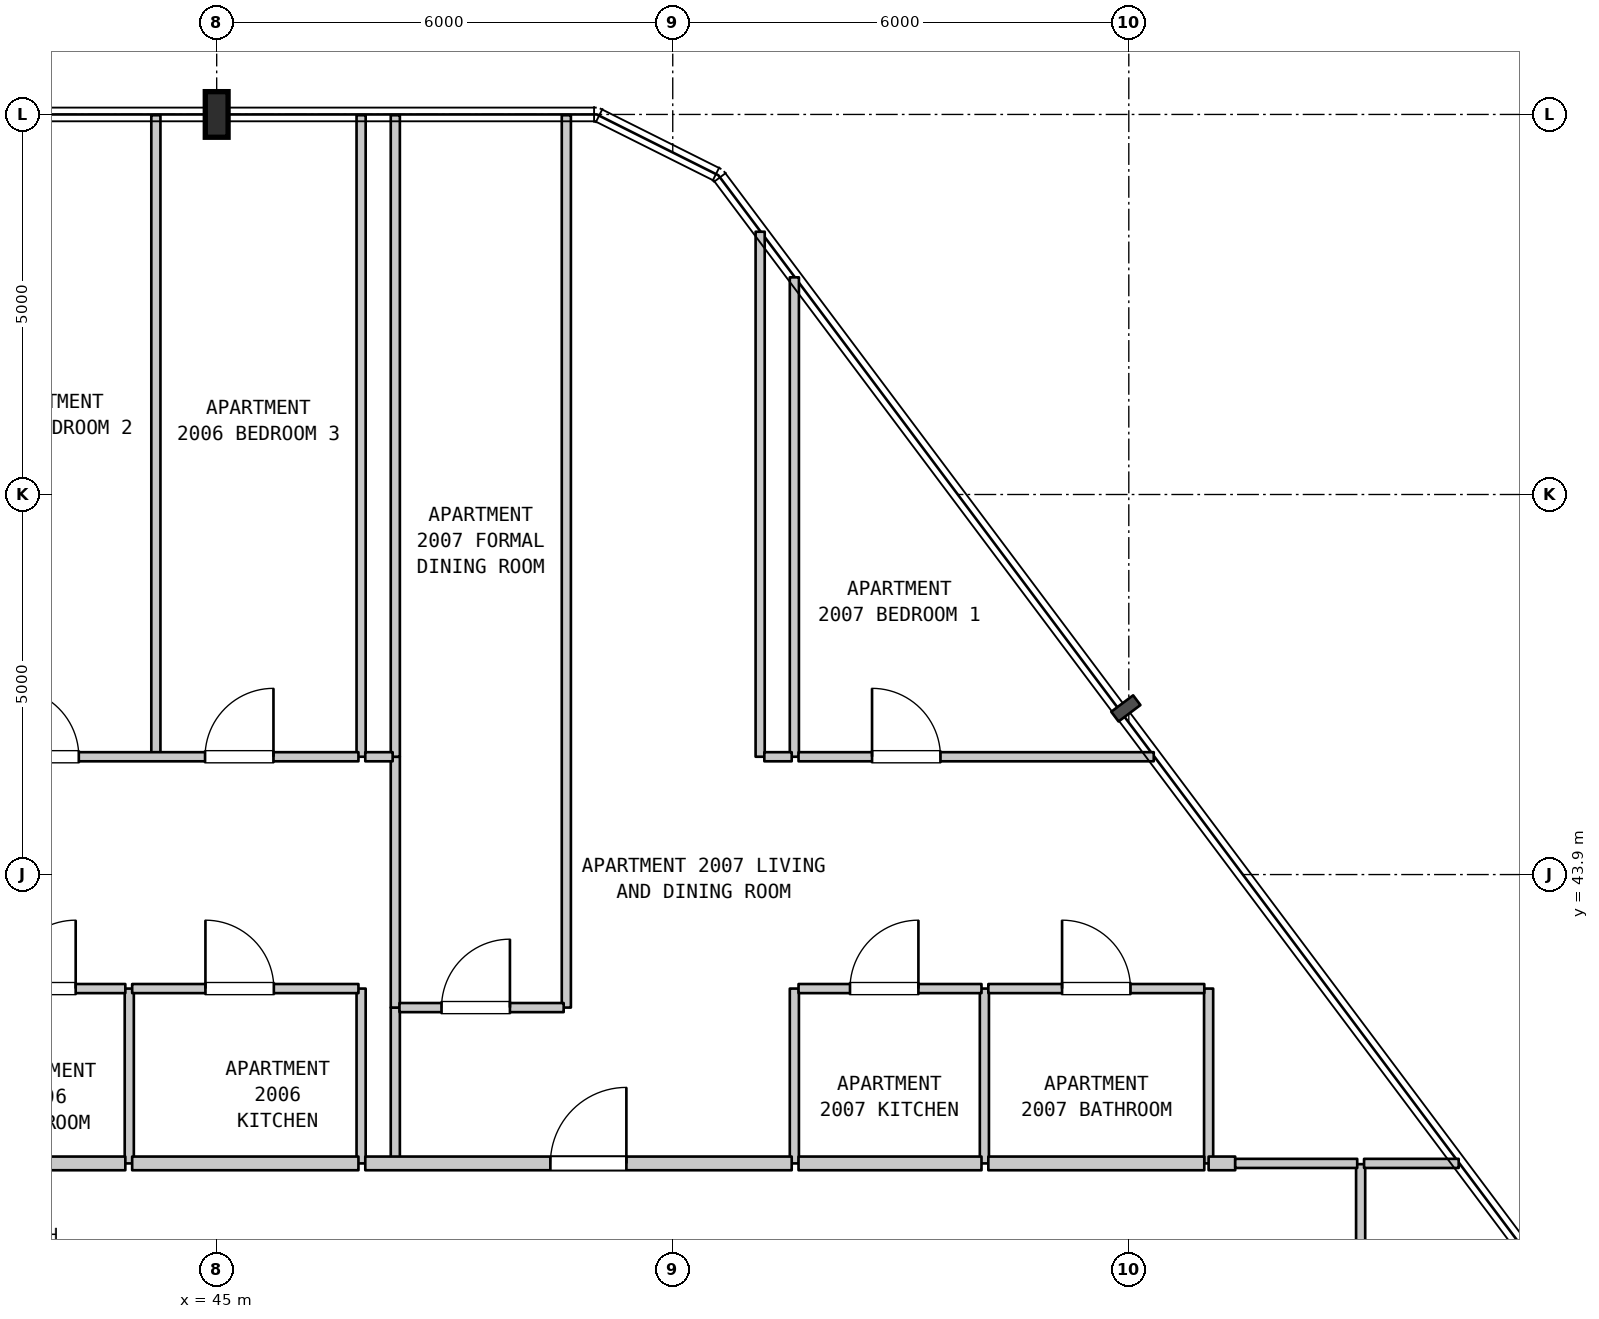
"""IFC4 building model, lengths in metres.
Left out: names, types, materials, properties, quantities, classifications, styles, units other than length and angle.
Written with IfcOpenShell. Run it as: python <this file> out.ifc"""

import sys

from ifc_helpers import new_model, si_unit, direction, frame, frame_2d, origin, origin_2d, place, context, subcontext, project, spatial, rectangle, i_section, extrude, element, fill, save


model = new_model("IFC4")
c1 = context("Model", 3, precision=1e-05, world=origin(), true_north=direction((0.0, 1.0)))
c2 = subcontext(c1, "Body", "Model", "MODEL_VIEW")
j1 = project(units=[si_unit("LENGTHUNIT", "METRE"), si_unit("PLANEANGLEUNIT", "RADIAN")], contexts=[c1])
p1 = place(None, origin())
s1 = spatial("IfcSite", under=j1, at=p1, CompositionType="ELEMENT")
p2 = place(p1, origin())
s2 = spatial("IfcBuilding", under=s1, at=p2, CompositionType="ELEMENT")
p3 = place(p2, frame((0.0, 0.0, 86.4)))
s3 = spatial("IfcBuildingStorey", under=s2, at=p3, CompositionType="ELEMENT", Elevation=86.4)
p4 = place(p3, frame((45.0, 53.9, 0.0), z_axis=(0.0, 0.0, 1.0), x_axis=(1.0, 0.0, 0.0)))
e1 = element("IfcColumn", 1, at=p4, inside=s3, PredefinedType="COLUMN", context=c2, shape_type="SweptSolid", body=[
    extrude(i_section(OverallWidth=0.3, OverallDepth=0.6, WebThickness=0.015, FlangeThickness=0.03, FilletRadius=0.027, at=origin_2d()), origin(), (0.0, 0.0, 1.0), 4.5),
])
p5 = place(p3, frame((43.85, 40.1, 0.0), z_axis=(0.0, 0.0, 1.0), x_axis=(0.0, 1.0, 0.0)))
e2 = element("IfcWall", 2, at=p5, inside=s3, PredefinedType="PARTITIONING", context=c2, shape_type="SweptSolid", body=[
    extrude(rectangle(XDim=2.3, YDim=0.12, at=frame_2d((1.15, 0.0))), origin(), (0.0, 0.0, 1.0), 4.185),
])
p6 = place(p3, frame((44.2, 45.45, 0.0), z_axis=(0.0, 0.0, 1.0), x_axis=(0.0, 1.0, 0.0)))
e3 = element("IfcWall", 3, at=p6, inside=s3, PredefinedType="PARTITIONING", context=c2, shape_type="SweptSolid", body=[
    extrude(rectangle(XDim=8.44, YDim=0.12, at=frame_2d((4.22, 0.0))), origin(), (0.0, 0.0, 1.0), 4.185),
])
p7 = place(p3, frame((46.9, 40.1, 0.0), z_axis=(0.0, 0.0, 1.0), x_axis=(0.0, 1.0, 0.0)))
e4 = element("IfcWall", 4, at=p7, inside=s3, PredefinedType="PARTITIONING", context=c2, shape_type="SweptSolid", body=[
    extrude(rectangle(XDim=2.3, YDim=0.12, at=frame_2d((1.15, 0.0))), origin(), (0.0, 0.0, 1.0), 4.185),
])
p8 = place(p3, frame((46.9, 45.45, 0.0), z_axis=(0.0, 0.0, 1.0), x_axis=(0.0, 1.0, 0.0)))
e5 = element("IfcWall", 5, at=p8, inside=s3, PredefinedType="PARTITIONING", context=c2, shape_type="SweptSolid", body=[
    extrude(rectangle(XDim=8.44, YDim=0.12, at=frame_2d((4.22, 0.0))), origin(), (0.0, 0.0, 1.0), 4.185),
])
p9 = place(p3, frame((47.35, 40.1, 0.0), z_axis=(0.0, 0.0, 1.0), x_axis=(0.0, 1.0, 0.0)))
e6 = element("IfcWall", 6, at=p9, inside=s3, PredefinedType="PARTITIONING", context=c2, shape_type="SweptSolid", body=[
    extrude(rectangle(XDim=2.05, YDim=0.12, at=frame_2d((1.025, 0.0))), origin(), (0.0, 0.0, 1.0), 4.185),
])
p10 = place(p3, frame((47.35, 42.15, 0.0), z_axis=(0.0, 0.0, 1.0), x_axis=(0.0, 1.0, 0.0)))
e7 = element("IfcWall", 7, at=p10, inside=s3, PredefinedType="PARTITIONING", context=c2, shape_type="SweptSolid", body=[
    extrude(rectangle(XDim=3.3, YDim=0.12, at=frame_2d((1.65, 0.0))), origin(), (0.0, 0.0, 1.0), 4.185),
])
p11 = place(p3, frame((47.35, 45.45, 0.0), z_axis=(0.0, 0.0, 1.0), x_axis=(0.0, 1.0, 0.0)))
e8 = element("IfcWall", 8, at=p11, inside=s3, PredefinedType="PARTITIONING", context=c2, shape_type="SweptSolid", body=[
    extrude(rectangle(XDim=8.44, YDim=0.12, at=frame_2d((4.22, 0.0))), origin(), (0.0, 0.0, 1.0), 4.185),
])
p12 = place(p3, frame((49.6, 42.15, 0.0), z_axis=(0.0, 0.0, 1.0), x_axis=(0.0, 1.0, 0.0)))
e9 = element("IfcWall", 9, at=p12, inside=s3, PredefinedType="PARTITIONING", context=c2, shape_type="SweptSolid", body=[
    extrude(rectangle(XDim=11.74, YDim=0.12, at=frame_2d((5.87, 0.0))), origin(), (0.0, 0.0, 1.0), 4.185),
])
p13 = place(p3, frame((52.15, 45.45, 0.0), z_axis=(0.0, 0.0, 1.0), x_axis=(0.0, 1.0, 0.0)))
e10 = element("IfcWall", 10, at=p13, inside=s3, PredefinedType="PARTITIONING", context=c2, shape_type="SweptSolid", body=[
    extrude(rectangle(XDim=6.907, YDim=0.12, at=frame_2d((3.454, 0.0))), origin(), (0.0, 0.0, 1.0), 4.185),
])
p14 = place(p3, frame((52.6, 40.1, 0.0), z_axis=(0.0, 0.0, 1.0), x_axis=(0.0, 1.0, 0.0)))
e11 = element("IfcWall", 11, at=p14, inside=s3, PredefinedType="PARTITIONING", context=c2, shape_type="SweptSolid", body=[
    extrude(rectangle(XDim=2.3, YDim=0.12, at=frame_2d((1.15, 0.0))), origin(), (0.0, 0.0, 1.0), 4.185),
])
p15 = place(p3, frame((52.6, 45.45, 0.0), z_axis=(0.0, 0.0, 1.0), x_axis=(0.0, 1.0, 0.0)))
e12 = element("IfcWall", 12, at=p15, inside=s3, PredefinedType="PARTITIONING", context=c2, shape_type="SweptSolid", body=[
    extrude(rectangle(XDim=6.307, YDim=0.12, at=frame_2d((3.154, 0.0))), origin(), (0.0, 0.0, 1.0), 4.185),
])
for number, where, z_axis, x_axis in (
    (13, (55.1, 40.1, 0.0), (0.0, 0.0, 1.0), (0.0, 1.0, 0.0)),
    (14, (58.05, 40.1, 0.0), (0.0, 0.0, 1.0), (0.0, 1.0, 0.0)),
):
    element("IfcWall", number, at=place(p3, frame(where, z_axis=z_axis, x_axis=x_axis)), inside=s3, PredefinedType="PARTITIONING", context=c2, shape_type="SweptSolid", body=[
        extrude(rectangle(XDim=2.3, YDim=0.12, at=frame_2d((1.15, 0.0))), origin(), (0.0, 0.0, 1.0), 4.185),
    ])
p16 = place(p3, frame((60.05, 37.89, 0.0), z_axis=(0.0, 0.0, 1.0), x_axis=(0.0, 1.0, 0.0)))
e15 = element("IfcWall", 15, at=p16, inside=s3, PredefinedType="PARTITIONING", context=c2, shape_type="SweptSolid", body=[
    extrude(rectangle(XDim=2.2, YDim=0.12, at=frame_2d((1.1, 0.0))), origin(), (0.0, 0.0, 1.0), 4.185),
])
p17 = place(p3, frame((41.657, 40.1, 0.0), z_axis=(0.0, 0.0, 1.0), x_axis=(1.0, 0.0, 0.0)))
e16 = element("IfcWall", 16, at=p17, inside=s3, PredefinedType="STANDARD", context=c2, shape_type="SweptSolid", body=[
    extrude(rectangle(XDim=2.141, YDim=0.18, at=frame_2d((1.071, 0.0))), origin(), (0.0, 0.0, 1.0), 4.185),
])
p18 = place(p3, frame((43.888, 40.1, 0.0), z_axis=(0.0, 0.0, 1.0), x_axis=(1.0, 0.0, 0.0)))
e17 = element("IfcWall", 17, at=p18, inside=s3, PredefinedType="STANDARD", context=c2, shape_type="SweptSolid", body=[
    extrude(rectangle(XDim=2.977, YDim=0.18, at=frame_2d((1.489, 0.0))), origin(), (0.0, 0.0, 1.0), 4.185),
])
p19 = place(p3, frame((46.955, 40.1, 0.0), z_axis=(0.0, 0.0, 1.0), x_axis=(1.0, 0.0, 0.0)))
e18 = element("IfcWall", 18, at=p19, inside=s3, PredefinedType="STANDARD", context=c2, shape_type="SweptSolid", body=[
    extrude(rectangle(XDim=5.61, YDim=0.18, at=frame_2d((2.805, 0.0))), origin(), (0.0, 0.0, 1.0), 4.185),
])
p20 = place(p19, frame((2.435, 0.0, 0.0)))
e19 = element("IfcOpeningElement", 19, at=p20, cuts=e18, PredefinedType="OPENING", context=c2, shape_type="SweptSolid", body=[
    extrude(rectangle(XDim=1.0, YDim=2.15, at=frame_2d((0.5, 1.075))), frame((0.0, 0.1, 0.0), z_axis=(0.0, -1.0, 0.0), x_axis=(1.0, 0.0, 0.0)), (0.0, 0.0, 1.0), 0.2),
])
p21 = place(p3, frame((52.655, 40.1, 0.0), z_axis=(0.0, 0.0, 1.0), x_axis=(1.0, 0.0, 0.0)))
e20 = element("IfcWall", 20, at=p21, inside=s3, PredefinedType="STANDARD", context=c2, shape_type="SweptSolid", body=[
    extrude(rectangle(XDim=2.407, YDim=0.18, at=frame_2d((1.204, 0.0))), origin(), (0.0, 0.0, 1.0), 4.185),
])
p22 = place(p3, frame((55.152, 40.1, 0.0), z_axis=(0.0, 0.0, 1.0), x_axis=(1.0, 0.0, 0.0)))
e21 = element("IfcWall", 21, at=p22, inside=s3, PredefinedType="STANDARD", context=c2, shape_type="SweptSolid", body=[
    extrude(rectangle(XDim=2.841, YDim=0.18, at=frame_2d((1.42, 0.0))), origin(), (0.0, 0.0, 1.0), 4.185),
])
p23 = place(p3, frame((58.05, 40.1, 0.0), z_axis=(0.0, 0.0, 1.0), x_axis=(1.0, 0.0, 0.0)))
e22 = element("IfcWall", 22, at=p23, inside=s3, PredefinedType="STANDARD", context=c2, shape_type="SweptSolid", body=[
    extrude(rectangle(XDim=0.35, YDim=0.18, at=frame_2d((0.175, 0.0))), origin(), (0.0, 0.0, 1.0), 4.185),
])
p24 = place(p3, frame((58.4, 40.1, 0.0), z_axis=(0.0, 0.0, 1.0), x_axis=(1.0, 0.0, 0.0)))
e23 = element("IfcWall", 23, at=p24, inside=s3, PredefinedType="PARTITIONING", context=c2, shape_type="SweptSolid", body=[
    extrude(rectangle(XDim=1.605, YDim=0.12, at=frame_2d((0.802, 0.0))), origin(), (0.0, 0.0, 1.0), 4.185),
])
p25 = place(p3, frame((60.095, 40.1, 0.0), z_axis=(0.0, 0.0, 1.0), x_axis=(1.0, 0.0, 0.0)))
e24 = element("IfcWall", 24, at=p25, inside=s3, PredefinedType="PARTITIONING", context=c2, shape_type="SweptSolid", body=[
    extrude(rectangle(XDim=1.245, YDim=0.12, at=frame_2d((0.623, 0.0))), origin(), (0.0, 0.0, 1.0), 4.185),
])
p26 = place(p3, frame((47.405, 42.15, 0.0), z_axis=(0.0, 0.0, 1.0), x_axis=(1.0, 0.0, 0.0)))
e25 = element("IfcWall", 25, at=p26, inside=s3, PredefinedType="PARTITIONING", context=c2, shape_type="SweptSolid", body=[
    extrude(rectangle(XDim=2.16, YDim=0.12, at=frame_2d((1.08, 0.0))), origin(), (0.0, 0.0, 1.0), 4.185),
])
p27 = place(p26, frame((0.553, 0.0, 0.0)))
e26 = element("IfcOpeningElement", 26, at=p27, cuts=e25, PredefinedType="OPENING", context=c2, shape_type="SweptSolid", body=[
    extrude(rectangle(XDim=0.9, YDim=2.15, at=frame_2d((0.45, 1.075))), frame((0.0, 0.07, 0.0), z_axis=(0.0, -1.0, 0.0), x_axis=(1.0, 0.0, 0.0)), (0.0, 0.0, 1.0), 0.14),
])
p28 = place(p3, frame((41.657, 42.4, 0.0), z_axis=(0.0, 0.0, 1.0), x_axis=(1.0, 0.0, 0.0)))
e27 = element("IfcWall", 27, at=p28, inside=s3, PredefinedType="PARTITIONING", context=c2, shape_type="SweptSolid", body=[
    extrude(rectangle(XDim=2.141, YDim=0.12, at=frame_2d((1.071, 0.0))), origin(), (0.0, 0.0, 1.0), 4.185),
])
p29 = place(p28, frame((0.588, 0.0, 0.0)))
e28 = element("IfcOpeningElement", 28, at=p29, cuts=e27, PredefinedType="OPENING", context=c2, shape_type="SweptSolid", body=[
    extrude(rectangle(XDim=0.9, YDim=2.1, at=frame_2d((0.45, 1.05))), frame((0.0, 0.07, 0.0), z_axis=(0.0, -1.0, 0.0), x_axis=(1.0, 0.0, 0.0)), (0.0, 0.0, 1.0), 0.14),
])
p30 = place(p3, frame((43.888, 42.4, 0.0), z_axis=(0.0, 0.0, 1.0), x_axis=(1.0, 0.0, 0.0)))
e29 = element("IfcWall", 29, at=p30, inside=s3, PredefinedType="PARTITIONING", context=c2, shape_type="SweptSolid", body=[
    extrude(rectangle(XDim=2.977, YDim=0.12, at=frame_2d((1.489, 0.0))), origin(), (0.0, 0.0, 1.0), 4.185),
])
p31 = place(p30, frame((0.964, 0.0, 0.0)))
e30 = element("IfcOpeningElement", 30, at=p31, cuts=e29, PredefinedType="OPENING", context=c2, shape_type="SweptSolid", body=[
    extrude(rectangle(XDim=0.9, YDim=2.15, at=frame_2d((0.45, 1.075))), frame((0.0, 0.07, 0.0), z_axis=(0.0, -1.0, 0.0), x_axis=(1.0, 0.0, 0.0)), (0.0, 0.0, 1.0), 0.14),
])
p32 = place(p3, frame((52.655, 42.4, 0.0), z_axis=(0.0, 0.0, 1.0), x_axis=(1.0, 0.0, 0.0)))
e31 = element("IfcWall", 31, at=p32, inside=s3, PredefinedType="PARTITIONING", context=c2, shape_type="SweptSolid", body=[
    extrude(rectangle(XDim=2.407, YDim=0.12, at=frame_2d((1.204, 0.0))), origin(), (0.0, 0.0, 1.0), 4.185),
])
p33 = place(p32, frame((0.677, 0.0, 0.0)))
e32 = element("IfcOpeningElement", 32, at=p33, cuts=e31, PredefinedType="OPENING", context=c2, shape_type="SweptSolid", body=[
    extrude(rectangle(XDim=0.9, YDim=2.15, at=frame_2d((0.45, 1.075))), frame((0.0, 0.07, 0.0), z_axis=(0.0, -1.0, 0.0), x_axis=(1.0, 0.0, 0.0)), (0.0, 0.0, 1.0), 0.14),
])
p34 = place(p3, frame((55.152, 42.4, 0.0), z_axis=(0.0, 0.0, 1.0), x_axis=(1.0, 0.0, 0.0)))
e33 = element("IfcWall", 33, at=p34, inside=s3, PredefinedType="PARTITIONING", context=c2, shape_type="SweptSolid", body=[
    extrude(rectangle(XDim=2.841, YDim=0.12, at=frame_2d((1.42, 0.0))), origin(), (0.0, 0.0, 1.0), 4.185),
])
p35 = place(p34, frame((0.97, 0.0, 0.0)))
e34 = element("IfcOpeningElement", 34, at=p35, cuts=e33, PredefinedType="OPENING", context=c2, shape_type="SweptSolid", body=[
    extrude(rectangle(XDim=0.9, YDim=2.1, at=frame_2d((0.45, 1.05))), frame((0.0, 0.07, 0.0), z_axis=(0.0, -1.0, 0.0), x_axis=(1.0, 0.0, 0.0)), (0.0, 0.0, 1.0), 0.14),
])
p36 = place(p3, frame((38.755, 45.45, 0.0), z_axis=(0.0, 0.0, 1.0), x_axis=(1.0, 0.0, 0.0)))
e35 = element("IfcWall", 35, at=p36, inside=s3, PredefinedType="PARTITIONING", context=c2, shape_type="SweptSolid", body=[
    extrude(rectangle(XDim=8.11, YDim=0.12, at=frame_2d((4.055, 0.0))), origin(), (0.0, 0.0, 1.0), 4.185),
])
p37 = place(p36, frame((0.975, 0.0, 0.0)))
e36 = element("IfcOpeningElement", 36, at=p37, cuts=e35, PredefinedType="OPENING", context=c2, shape_type="SweptSolid", body=[
    extrude(rectangle(XDim=0.9, YDim=2.15, at=frame_2d((0.45, 1.075))), frame((0.0, 0.07, 0.0), z_axis=(0.0, -1.0, 0.0), x_axis=(1.0, 0.0, 0.0)), (0.0, 0.0, 1.0), 0.14),
])
p38 = place(p36, frame((3.531, 0.0, 0.0)))
e37 = element("IfcOpeningElement", 37, at=p38, cuts=e35, PredefinedType="OPENING", context=c2, shape_type="SweptSolid", body=[
    extrude(rectangle(XDim=0.9, YDim=2.15, at=frame_2d((0.45, 1.075))), frame((0.0, 0.07, 0.0), z_axis=(0.0, -1.0, 0.0), x_axis=(1.0, 0.0, 0.0)), (0.0, 0.0, 1.0), 0.14),
])
p39 = place(p36, frame((6.092, 0.0, 0.0)))
e38 = element("IfcOpeningElement", 38, at=p39, cuts=e35, PredefinedType="OPENING", context=c2, shape_type="SweptSolid", body=[
    extrude(rectangle(XDim=0.9, YDim=2.15, at=frame_2d((0.45, 1.075))), frame((0.0, 0.07, 0.0), z_axis=(0.0, -1.0, 0.0), x_axis=(1.0, 0.0, 0.0)), (0.0, 0.0, 1.0), 0.14),
])
for number, where, z_axis, x_axis in (
    (39, (46.955, 45.45, 0.0), (0.0, 0.0, 1.0), (1.0, 0.0, 0.0)),
    (40, (52.205, 45.45, 0.0), (0.0, 0.0, 1.0), (1.0, 0.0, 0.0)),
):
    element("IfcWall", number, at=place(p3, frame(where, z_axis=z_axis, x_axis=x_axis)), inside=s3, PredefinedType="PARTITIONING", context=c2, shape_type="SweptSolid", body=[
        extrude(rectangle(XDim=0.36, YDim=0.12, at=frame_2d((0.18, 0.0))), origin(), (0.0, 0.0, 1.0), 4.185),
    ])
p40 = place(p3, frame((52.655, 45.45, 0.0), z_axis=(0.0, 0.0, 1.0), x_axis=(1.0, 0.0, 0.0)))
e41 = element("IfcWall", 41, at=p40, inside=s3, PredefinedType="PARTITIONING", context=c2, shape_type="SweptSolid", body=[
    extrude(rectangle(XDim=4.673, YDim=0.12, at=frame_2d((2.336, 0.0))), origin(), (0.0, 0.0, 1.0), 4.185),
])
p41 = place(p40, frame((0.967, 0.0, 0.0)))
e42 = element("IfcOpeningElement", 42, at=p41, cuts=e41, PredefinedType="OPENING", context=c2, shape_type="SweptSolid", body=[
    extrude(rectangle(XDim=0.9, YDim=2.15, at=frame_2d((0.45, 1.075))), frame((0.0, 0.07, 0.0), z_axis=(0.0, -1.0, 0.0), x_axis=(1.0, 0.0, 0.0)), (0.0, 0.0, 1.0), 0.14),
])
p42 = place(p20, origin())
e43 = element("IfcDoor", 43, at=p42, inside=s3, OperationType="SINGLE_SWING_RIGHT", PredefinedType="DOOR", context=c2, shape_type="SweptSolid", body=[
    extrude(rectangle(XDim=1.0, YDim=2.15, at=frame_2d((0.5, 1.075))), frame((0.0, 0.025, 0.0), z_axis=(0.0, -1.0, 0.0), x_axis=(1.0, 0.0, 0.0)), (0.0, 0.0, 1.0), 0.05),
])
fill(e19, e43)
p43 = place(p27, origin())
e44 = element("IfcDoor", 44, at=p43, inside=s3, OperationType="SINGLE_SWING_RIGHT", PredefinedType="DOOR", context=c2, shape_type="SweptSolid", body=[
    extrude(rectangle(XDim=0.9, YDim=2.15, at=frame_2d((0.45, 1.075))), frame((0.0, 0.025, 0.0), z_axis=(0.0, -1.0, 0.0), x_axis=(1.0, 0.0, 0.0)), (0.0, 0.0, 1.0), 0.05),
])
fill(e26, e44)
p44 = place(p29, origin())
e45 = element("IfcDoor", 45, at=p44, inside=s3, OperationType="SINGLE_SWING_RIGHT", PredefinedType="DOOR", context=c2, shape_type="SweptSolid", body=[
    extrude(rectangle(XDim=0.9, YDim=2.1, at=frame_2d((0.45, 1.05))), frame((0.0, 0.025, 0.0), z_axis=(0.0, -1.0, 0.0), x_axis=(1.0, 0.0, 0.0)), (0.0, 0.0, 1.0), 0.05),
])
fill(e28, e45)
p45 = place(p31, origin())
e46 = element("IfcDoor", 46, at=p45, inside=s3, OperationType="SINGLE_SWING_LEFT", PredefinedType="DOOR", context=c2, shape_type="SweptSolid", body=[
    extrude(rectangle(XDim=0.9, YDim=2.15, at=frame_2d((0.45, 1.075))), frame((0.0, 0.025, 0.0), z_axis=(0.0, -1.0, 0.0), x_axis=(1.0, 0.0, 0.0)), (0.0, 0.0, 1.0), 0.05),
])
fill(e30, e46)
p46 = place(p33, origin())
e47 = element("IfcDoor", 47, at=p46, inside=s3, OperationType="SINGLE_SWING_RIGHT", PredefinedType="DOOR", context=c2, shape_type="SweptSolid", body=[
    extrude(rectangle(XDim=0.9, YDim=2.15, at=frame_2d((0.45, 1.075))), frame((0.0, 0.025, 0.0), z_axis=(0.0, -1.0, 0.0), x_axis=(1.0, 0.0, 0.0)), (0.0, 0.0, 1.0), 0.05),
])
fill(e32, e47)
p47 = place(p35, origin())
e48 = element("IfcDoor", 48, at=p47, inside=s3, OperationType="SINGLE_SWING_LEFT", PredefinedType="DOOR", context=c2, shape_type="SweptSolid", body=[
    extrude(rectangle(XDim=0.9, YDim=2.1, at=frame_2d((0.45, 1.05))), frame((0.0, 0.025, 0.0), z_axis=(0.0, -1.0, 0.0), x_axis=(1.0, 0.0, 0.0)), (0.0, 0.0, 1.0), 0.05),
])
fill(e34, e48)
p48 = place(p38, origin())
e49 = element("IfcDoor", 49, at=p48, inside=s3, OperationType="SINGLE_SWING_LEFT", PredefinedType="DOOR", context=c2, shape_type="SweptSolid", body=[
    extrude(rectangle(XDim=0.9, YDim=2.15, at=frame_2d((0.45, 1.075))), frame((0.0, 0.025, 0.0), z_axis=(0.0, -1.0, 0.0), x_axis=(1.0, 0.0, 0.0)), (0.0, 0.0, 1.0), 0.05),
])
fill(e37, e49)
p49 = place(p39, origin())
e50 = element("IfcDoor", 50, at=p49, inside=s3, OperationType="SINGLE_SWING_RIGHT", PredefinedType="DOOR", context=c2, shape_type="SweptSolid", body=[
    extrude(rectangle(XDim=0.9, YDim=2.15, at=frame_2d((0.45, 1.075))), frame((0.0, 0.025, 0.0), z_axis=(0.0, -1.0, 0.0), x_axis=(1.0, 0.0, 0.0)), (0.0, 0.0, 1.0), 0.05),
])
fill(e38, e50)
p50 = place(p41, origin())
e51 = element("IfcDoor", 51, at=p50, inside=s3, OperationType="SINGLE_SWING_LEFT", PredefinedType="DOOR", context=c2, shape_type="SweptSolid", body=[
    extrude(rectangle(XDim=0.9, YDim=2.15, at=frame_2d((0.45, 1.075))), frame((0.0, 0.025, 0.0), z_axis=(0.0, -1.0, 0.0), x_axis=(1.0, 0.0, 0.0)), (0.0, 0.0, 1.0), 0.05),
])
fill(e42, e51)
save(model, sys.argv[1])
